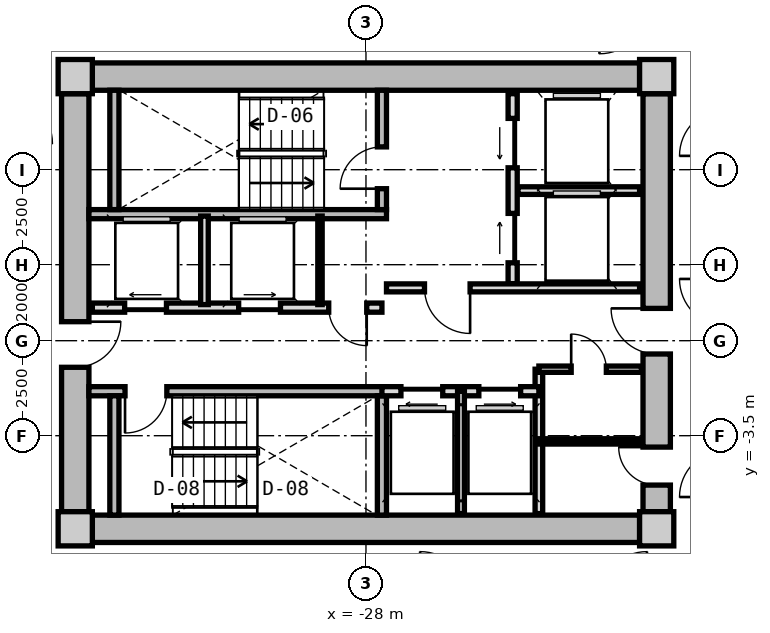
"""IFC4 building model, lengths in metres.
Left out: names, types, materials, properties, quantities, classifications, styles, units other than length and angle.
Written with IfcOpenShell. Run it as: python <this file> out.ifc"""

import sys

from ifc_helpers import new_model, si_unit, direction, frame, frame_2d, origin, origin_2d, place, context, subcontext, project, spatial, rectangle, extrude, source, transform, mapped, element, fill, save


model = new_model("IFC4")
c1 = context("Model", 3, precision=1e-05, world=origin(), true_north=direction((0.0, 1.0)))
c2 = subcontext(c1, "Body", "Model", "MODEL_VIEW")
j1 = project(units=[si_unit("LENGTHUNIT", "METRE"), si_unit("PLANEANGLEUNIT", "RADIAN")], contexts=[c1])
p1 = place(None, origin())
s1 = spatial("IfcSite", under=j1, at=p1, CompositionType="ELEMENT")
p2 = place(p1, origin())
s2 = spatial("IfcBuilding", under=s1, at=p2, CompositionType="ELEMENT")
p3 = place(p2, frame((0.0, 0.0, 77.95)))
s3 = spatial("IfcBuildingStorey", under=s2, at=p3, CompositionType="ELEMENT", Elevation=77.95)
m1 = source(origin(), c2, "Body", "SweptSolid", [
    extrude(rectangle(XDim=0.9, YDim=0.9, at=origin_2d()), origin(), (0.0, 0.0, 1.0), 3.05),
])
for number, where, z_axis, x_axis in (
    (1, (-35.65, -5.95, 0.0), (0.0, 0.0, 1.0), (1.0, 0.0, 0.0)),
    (2, (-20.35, -5.95, 0.0), (0.0, 0.0, 1.0), (1.0, 0.0, 0.0)),
    (3, (-20.35, 5.95, 0.0), (0.0, 0.0, 1.0), (1.0, 0.0, 0.0)),
    (4, (-35.65, 5.95, 0.0), (0.0, 0.0, 1.0), (1.0, 0.0, 0.0)),
):
    element("IfcColumn", number, at=place(p3, frame(where, z_axis=z_axis, x_axis=x_axis)), inside=s3, PredefinedType="COLUMN", context=c2, shape_type="MappedRepresentation", body=[
        mapped(m1, transform((0.0, 0.0, 0.0), x_axis=(1.0, 0.0, 0.0), y_axis=(0.0, 1.0, 0.0), z_axis=(0.0, 0.0, 1.0), scale=1.0)),
    ])
m2 = source(origin(), c2, "Body", "SweptSolid", [
    extrude(rectangle(XDim=14.4, YDim=0.72, at=frame_2d((7.2, 0.0))), origin(), (0.0, 0.0, 1.0), 2.79),
])
for number, where, z_axis, x_axis in (
    (5, (-35.2, 5.95, 0.0), (0.0, 0.0, 1.0), (1.0, 0.0, 0.0)),
    (6, (-20.8, -5.95, 0.0), (0.0, 0.0, 1.0), (-1.0, 0.0, 0.0)),
):
    element("IfcWall", number, at=place(p3, frame(where, z_axis=z_axis, x_axis=x_axis)), inside=s3, PredefinedType="SHEAR", context=c2, shape_type="MappedRepresentation", body=[
        mapped(m2, transform((0.0, 0.0, 0.0), x_axis=(1.0, 0.0, 0.0), y_axis=(0.0, 1.0, 0.0), z_axis=(0.0, 0.0, 1.0), scale=1.0)),
    ])
m3 = source(origin(), c2, "Body", "SweptSolid", [
    extrude(rectangle(XDim=11.0, YDim=0.72, at=frame_2d((5.5, 0.0))), origin(), (0.0, 0.0, 1.0), 2.79),
])
p4 = place(p3, frame((-35.65, -5.5, 0.0), z_axis=(0.0, 0.0, 1.0), x_axis=(0.0, 1.0, 0.0)))
e7 = element("IfcWall", 7, at=p4, inside=s3, PredefinedType="SHEAR", context=c2, shape_type="MappedRepresentation", body=[
    mapped(m3, transform((0.0, 0.0, 0.0), x_axis=(1.0, 0.0, 0.0), y_axis=(0.0, 1.0, 0.0), z_axis=(0.0, 0.0, 1.0), scale=1.0)),
])
p5 = place(p4, frame((3.8, 0.0, 0.0)))
e8 = element("IfcOpeningElement", 8, at=p5, cuts=e7, PredefinedType="OPENING", context=c2, shape_type="SweptSolid", body=[
    extrude(rectangle(XDim=1.2, YDim=2.15, at=frame_2d((0.6, 1.075))), frame((0.0, 0.37, 0.0), z_axis=(0.0, -1.0, 0.0), x_axis=(1.0, 0.0, 0.0)), (0.0, 0.0, 1.0), 0.74),
])
p6 = place(p3, frame((-20.35, 5.5, 0.0), z_axis=(0.0, 0.0, 1.0), x_axis=(0.0, -1.0, 0.0)))
e9 = element("IfcWall", 9, at=p6, inside=s3, PredefinedType="SHEAR", context=c2, shape_type="MappedRepresentation", body=[
    mapped(m3, transform((0.0, 0.0, 0.0), x_axis=(1.0, 0.0, 0.0), y_axis=(0.0, 1.0, 0.0), z_axis=(0.0, 0.0, 1.0), scale=1.0)),
])
p7 = place(p6, frame((5.65, 0.0, 0.0)))
e10 = element("IfcOpeningElement", 10, at=p7, cuts=e9, PredefinedType="OPENING", context=c2, shape_type="SweptSolid", body=[
    extrude(rectangle(XDim=1.2, YDim=2.15, at=frame_2d((0.6, 1.075))), frame((0.0, 0.37, 0.0), z_axis=(0.0, -1.0, 0.0), x_axis=(1.0, 0.0, 0.0)), (0.0, 0.0, 1.0), 0.74),
])
p8 = place(p6, frame((9.3, 0.0, 0.0)))
e11 = element("IfcOpeningElement", 11, at=p8, cuts=e9, PredefinedType="OPENING", context=c2, shape_type="SweptSolid", body=[
    extrude(rectangle(XDim=1.0, YDim=2.1, at=frame_2d((0.5, 1.05))), frame((0.0, 0.37, 0.0), z_axis=(0.0, -1.0, 0.0), x_axis=(1.0, 0.0, 0.0)), (0.0, 0.0, 1.0), 0.74),
])
m4 = source(origin(), c2, "Body", "SweptSolid", [
    extrude(rectangle(XDim=7.83, YDim=0.24, at=frame_2d((3.915, 0.0))), origin(), (0.0, 0.0, 1.0), 2.79),
])
p9 = place(p3, frame((-35.29, 2.33, 0.0), z_axis=(0.0, 0.0, 1.0), x_axis=(1.0, 0.0, 0.0)))
e12 = element("IfcWall", 12, at=p9, inside=s3, PredefinedType="PARTITIONING", context=c2, shape_type="MappedRepresentation", body=[
    mapped(m4, transform((0.0, 0.0, 0.0), x_axis=(1.0, 0.0, 0.0), y_axis=(0.0, 1.0, 0.0), z_axis=(0.0, 0.0, 1.0), scale=1.0)),
])
m5 = source(origin(), c2, "Body", "SweptSolid", [
    extrude(rectangle(XDim=3.14, YDim=0.24, at=frame_2d((1.57, 0.0))), origin(), (0.0, 0.0, 1.0), 2.79),
])
p10 = place(p3, frame((-34.62, 2.45, 0.0), z_axis=(0.0, 0.0, 1.0), x_axis=(0.0, 1.0, 0.0)))
e13 = element("IfcWall", 13, at=p10, inside=s3, PredefinedType="PARTITIONING", context=c2, shape_type="MappedRepresentation", body=[
    mapped(m5, transform((0.0, 0.0, 0.0), x_axis=(1.0, 0.0, 0.0), y_axis=(0.0, 1.0, 0.0), z_axis=(0.0, 0.0, 1.0), scale=1.0)),
])
p11 = place(p3, frame((-27.58, 2.45, 0.0), z_axis=(0.0, 0.0, 1.0), x_axis=(0.0, 1.0, 0.0)))
e14 = element("IfcWall", 14, at=p11, inside=s3, PredefinedType="PARTITIONING", context=c2, shape_type="MappedRepresentation", body=[
    mapped(m5, transform((0.0, 0.0, 0.0), x_axis=(1.0, 0.0, 0.0), y_axis=(0.0, 1.0, 0.0), z_axis=(0.0, 0.0, 1.0), scale=1.0)),
])
p12 = place(p11, frame((0.55, 0.0, 0.0)))
e15 = element("IfcOpeningElement", 15, at=p12, cuts=e14, PredefinedType="OPENING", context=c2, shape_type="SweptSolid", body=[
    extrude(rectangle(XDim=1.1, YDim=2.15, at=frame_2d((0.55, 1.075))), frame((0.0, 0.13, 0.0), z_axis=(0.0, -1.0, 0.0), x_axis=(1.0, 0.0, 0.0)), (0.0, 0.0, 1.0), 0.26),
])
p13 = place(p3, frame((-35.29, -2.33, 0.0), z_axis=(0.0, 0.0, 1.0), x_axis=(1.0, 0.0, 0.0)))
e16 = element("IfcWall", 16, at=p13, inside=s3, PredefinedType="PARTITIONING", context=c2, shape_type="MappedRepresentation", body=[
    mapped(m4, transform((0.0, 0.0, 0.0), x_axis=(1.0, 0.0, 0.0), y_axis=(0.0, 1.0, 0.0), z_axis=(0.0, 0.0, 1.0), scale=1.0)),
])
p14 = place(p13, frame((0.95, 0.0, 0.0)))
e17 = element("IfcOpeningElement", 17, at=p14, cuts=e16, PredefinedType="OPENING", context=c2, shape_type="SweptSolid", body=[
    extrude(rectangle(XDim=1.1, YDim=2.15, at=frame_2d((0.55, 1.075))), frame((0.0, 0.13, 0.0), z_axis=(0.0, -1.0, 0.0), x_axis=(1.0, 0.0, 0.0)), (0.0, 0.0, 1.0), 0.26),
])
for number, where, z_axis, x_axis in (
    (18, (-34.62, -5.59, 0.0), (0.0, 0.0, 1.0), (0.0, 1.0, 0.0)),
    (19, (-27.58, -5.59, 0.0), (0.0, 0.0, 1.0), (0.0, 1.0, 0.0)),
):
    element("IfcWall", number, at=place(p3, frame(where, z_axis=z_axis, x_axis=x_axis)), inside=s3, PredefinedType="PARTITIONING", context=c2, shape_type="MappedRepresentation", body=[
        mapped(m5, transform((0.0, 0.0, 0.0), x_axis=(1.0, 0.0, 0.0), y_axis=(0.0, 1.0, 0.0), z_axis=(0.0, 0.0, 1.0), scale=1.0)),
    ])
m6 = source(origin(), c2, "Body", "SweptSolid", [
    extrude(rectangle(XDim=5.0, YDim=0.24, at=frame_2d((2.5, 0.0))), origin(), (0.0, 0.0, 1.0), 2.775),
])
p15 = place(p3, frame((-24.14, 0.5, 0.0), z_axis=(0.0, 0.0, 1.0), x_axis=(0.0, 1.0, 0.0)))
e20 = element("IfcWall", 20, at=p15, inside=s3, PredefinedType="PARTITIONING", context=c2, shape_type="MappedRepresentation", body=[
    mapped(m6, transform((0.0, 0.0, 0.0), x_axis=(1.0, 0.0, 0.0), y_axis=(0.0, 1.0, 0.0), z_axis=(0.0, 0.0, 1.0), scale=1.0)),
])
p16 = place(p15, frame((3.05, 0.0, 0.0)))
e21 = element("IfcOpeningElement", 21, at=p16, cuts=e20, PredefinedType="OPENING", context=c2, shape_type="SweptSolid", body=[
    extrude(rectangle(XDim=1.3, YDim=2.2, at=frame_2d((0.65, 1.1))), frame((0.0, 0.13, 0.0), z_axis=(0.0, -1.0, 0.0), x_axis=(1.0, 0.0, 0.0)), (0.0, 0.0, 1.0), 0.26),
])
p17 = place(p15, frame((0.55, 0.0, 0.0)))
e22 = element("IfcOpeningElement", 22, at=p17, cuts=e20, PredefinedType="OPENING", context=c2, shape_type="SweptSolid", body=[
    extrude(rectangle(XDim=1.3, YDim=2.2, at=frame_2d((0.65, 1.1))), frame((0.0, 0.13, 0.0), z_axis=(0.0, -1.0, 0.0), x_axis=(1.0, 0.0, 0.0)), (0.0, 0.0, 1.0), 0.26),
])
m7 = source(origin(), c2, "Body", "SweptSolid", [
    extrude(rectangle(XDim=3.2, YDim=0.2, at=frame_2d((1.6, 0.0))), origin(), (0.0, 0.0, 1.0), 2.775),
])
p18 = place(p3, frame((-24.0, 2.95, 0.0), z_axis=(0.0, 0.0, 1.0), x_axis=(1.0, 0.0, 0.0)))
e23 = element("IfcWall", 23, at=p18, inside=s3, PredefinedType="PARTITIONING", context=c2, shape_type="MappedRepresentation", body=[
    mapped(m7, transform((0.0, 0.0, 0.0), x_axis=(1.0, 0.0, 0.0), y_axis=(0.0, 1.0, 0.0), z_axis=(0.0, 0.0, 1.0), scale=1.0)),
])
m8 = source(origin(), c2, "Body", "SweptSolid", [
    extrude(rectangle(XDim=6.66, YDim=0.21, at=frame_2d((3.33, 0.0))), origin(), (0.0, 0.0, 1.0), 2.775),
])
p19 = place(p3, frame((-27.46, 0.39, 0.0), z_axis=(0.0, 0.0, 1.0), x_axis=(1.0, 0.0, 0.0)))
e24 = element("IfcWall", 24, at=p19, inside=s3, PredefinedType="PARTITIONING", context=c2, shape_type="MappedRepresentation", body=[
    mapped(m8, transform((0.0, 0.0, 0.0), x_axis=(1.0, 0.0, 0.0), y_axis=(0.0, 1.0, 0.0), z_axis=(0.0, 0.0, 1.0), scale=1.0)),
])
p20 = place(p19, frame((1.0, 0.0, 0.0)))
e25 = element("IfcOpeningElement", 25, at=p20, cuts=e24, PredefinedType="OPENING", context=c2, shape_type="SweptSolid", body=[
    extrude(rectangle(XDim=1.2, YDim=2.15, at=frame_2d((0.6, 1.075))), frame((0.0, 0.115, 0.0), z_axis=(0.0, -1.0, 0.0), x_axis=(1.0, 0.0, 0.0)), (0.0, 0.0, 1.0), 0.23),
])
m9 = source(origin(), c2, "Body", "SweptSolid", [
    extrude(rectangle(XDim=7.62, YDim=0.24, at=frame_2d((3.81, 0.0))), origin(), (0.0, 0.0, 1.0), 2.775),
])
p21 = place(p3, frame((-35.2, -0.13, 0.0), z_axis=(0.0, 0.0, 1.0), x_axis=(1.0, 0.0, 0.0)))
e26 = element("IfcWall", 26, at=p21, inside=s3, PredefinedType="PARTITIONING", context=c2, shape_type="MappedRepresentation", body=[
    mapped(m9, transform((0.0, 0.0, 0.0), x_axis=(1.0, 0.0, 0.0), y_axis=(0.0, 1.0, 0.0), z_axis=(0.0, 0.0, 1.0), scale=1.0)),
])
p22 = place(p21, frame((6.22, 0.0, 0.0)))
e27 = element("IfcOpeningElement", 27, at=p22, cuts=e26, PredefinedType="OPENING", context=c2, shape_type="SweptSolid", body=[
    extrude(rectangle(XDim=1.0, YDim=2.1, at=frame_2d((0.5, 1.05))), frame((0.0, 0.13, 0.0), z_axis=(0.0, -1.0, 0.0), x_axis=(1.0, 0.0, 0.0)), (0.0, 0.0, 1.0), 0.26),
])
p23 = place(p21, frame((0.85, 0.0, 0.0)))
e28 = element("IfcOpeningElement", 28, at=p23, cuts=e26, PredefinedType="OPENING", context=c2, shape_type="SweptSolid", body=[
    extrude(rectangle(XDim=1.1, YDim=2.2, at=frame_2d((0.55, 1.1))), frame((0.0, 0.13, 0.0), z_axis=(0.0, -1.0, 0.0), x_axis=(1.0, 0.0, 0.0)), (0.0, 0.0, 1.0), 0.26),
])
p24 = place(p21, frame((3.85, 0.0, 0.0)))
e29 = element("IfcOpeningElement", 29, at=p24, cuts=e26, PredefinedType="OPENING", context=c2, shape_type="SweptSolid", body=[
    extrude(rectangle(XDim=1.1, YDim=2.2, at=frame_2d((0.55, 1.1))), frame((0.0, 0.13, 0.0), z_axis=(0.0, -1.0, 0.0), x_axis=(1.0, 0.0, 0.0)), (0.0, 0.0, 1.0), 0.26),
])
m10 = source(origin(), c2, "Body", "SweptSolid", [
    extrude(rectangle(XDim=2.33, YDim=0.115, at=frame_2d((1.165, 0.0))), origin(), (0.0, 0.0, 1.0), 2.775),
])
p25 = place(p3, frame((-29.21, -0.05, 0.0), z_axis=(0.0, 0.0, 1.0), x_axis=(0.0, 1.0, 0.0)))
e30 = element("IfcWall", 30, at=p25, inside=s3, PredefinedType="PARTITIONING", context=c2, shape_type="MappedRepresentation", body=[
    mapped(m10, transform((0.0, 0.0, 0.0), x_axis=(1.0, 0.0, 0.0), y_axis=(0.0, 1.0, 0.0), z_axis=(0.0, 0.0, 1.0), scale=1.0)),
])
m11 = source(origin(), c2, "Body", "SweptSolid", [
    extrude(rectangle(XDim=2.33, YDim=0.2, at=frame_2d((1.165, 0.0))), origin(), (0.0, 0.0, 1.0), 2.775),
])
p26 = place(p3, frame((-32.25, -0.05, 0.0), z_axis=(0.0, 0.0, 1.0), x_axis=(0.0, 1.0, 0.0)))
e31 = element("IfcWall", 31, at=p26, inside=s3, PredefinedType="PARTITIONING", context=c2, shape_type="MappedRepresentation", body=[
    mapped(m11, transform((0.0, 0.0, 0.0), x_axis=(1.0, 0.0, 0.0), y_axis=(0.0, 1.0, 0.0), z_axis=(0.0, 0.0, 1.0), scale=1.0)),
])
m12 = source(origin(), c2, "Body", "SweptSolid", [
    extrude(rectangle(XDim=3.8, YDim=0.2, at=frame_2d((1.9, 0.0))), origin(), (0.0, 0.0, 1.0), 2.775),
])
p27 = place(p3, frame((-23.45, -5.55, 0.0), z_axis=(0.0, 0.0, 1.0), x_axis=(0.0, 1.0, 0.0)))
e32 = element("IfcWall", 32, at=p27, inside=s3, PredefinedType="PARTITIONING", context=c2, shape_type="MappedRepresentation", body=[
    mapped(m12, transform((0.0, 0.0, 0.0), x_axis=(1.0, 0.0, 0.0), y_axis=(0.0, 1.0, 0.0), z_axis=(0.0, 0.0, 1.0), scale=1.0)),
])
m13 = source(origin(), c2, "Body", "SweptSolid", [
    extrude(rectangle(XDim=4.13, YDim=0.24, at=frame_2d((2.065, 0.0))), origin(), (0.0, 0.0, 1.0), 2.775),
])
p28 = place(p3, frame((-27.58, -2.33, 0.0), z_axis=(0.0, 0.0, 1.0), x_axis=(1.0, 0.0, 0.0)))
e33 = element("IfcWall", 33, at=p28, inside=s3, PredefinedType="PARTITIONING", context=c2, shape_type="MappedRepresentation", body=[
    mapped(m13, transform((0.0, 0.0, 0.0), x_axis=(1.0, 0.0, 0.0), y_axis=(0.0, 1.0, 0.0), z_axis=(0.0, 0.0, 1.0), scale=1.0)),
])
p29 = place(p28, frame((0.5, 0.0, 0.0)))
e34 = element("IfcOpeningElement", 34, at=p29, cuts=e33, PredefinedType="OPENING", context=c2, shape_type="SweptSolid", body=[
    extrude(rectangle(XDim=1.1, YDim=2.2, at=frame_2d((0.55, 1.1))), frame((0.0, 0.13, 0.0), z_axis=(0.0, -1.0, 0.0), x_axis=(1.0, 0.0, 0.0)), (0.0, 0.0, 1.0), 0.26),
])
p30 = place(p28, frame((2.55, 0.0, 0.0)))
e35 = element("IfcOpeningElement", 35, at=p30, cuts=e33, PredefinedType="OPENING", context=c2, shape_type="SweptSolid", body=[
    extrude(rectangle(XDim=1.1, YDim=2.2, at=frame_2d((0.55, 1.1))), frame((0.0, 0.13, 0.0), z_axis=(0.0, -1.0, 0.0), x_axis=(1.0, 0.0, 0.0)), (0.0, 0.0, 1.0), 0.26),
])
m14 = source(origin(), c2, "Body", "SweptSolid", [
    extrude(rectangle(XDim=3.22, YDim=0.18, at=frame_2d((1.61, 0.0))), origin(), (0.0, 0.0, 1.0), 2.775),
])
p31 = place(p3, frame((-25.5, -5.55, 0.0), z_axis=(0.0, 0.0, 1.0), x_axis=(0.0, 1.0, 0.0)))
e36 = element("IfcWall", 36, at=p31, inside=s3, PredefinedType="PARTITIONING", context=c2, shape_type="MappedRepresentation", body=[
    mapped(m14, transform((0.0, 0.0, 0.0), x_axis=(1.0, 0.0, 0.0), y_axis=(0.0, 1.0, 0.0), z_axis=(0.0, 0.0, 1.0), scale=1.0)),
])
m15 = source(origin(), c2, "Body", "SweptSolid", [
    extrude(rectangle(XDim=2.7, YDim=0.165, at=frame_2d((1.35, 0.0))), origin(), (0.0, 0.0, 1.0), 2.775),
])
p32 = place(p3, frame((-23.45, -1.75, 0.0), z_axis=(0.0, 0.0, 1.0), x_axis=(1.0, 0.0, 0.0)))
e37 = element("IfcWall", 37, at=p32, inside=s3, PredefinedType="PARTITIONING", context=c2, shape_type="MappedRepresentation", body=[
    mapped(m15, transform((0.0, 0.0, 0.0), x_axis=(1.0, 0.0, 0.0), y_axis=(0.0, 1.0, 0.0), z_axis=(0.0, 0.0, 1.0), scale=1.0)),
])
p33 = place(p32, frame((0.85, 0.0, 0.0)))
e38 = element("IfcOpeningElement", 38, at=p33, cuts=e37, PredefinedType="OPENING", context=c2, shape_type="SweptSolid", body=[
    extrude(rectangle(XDim=0.925, YDim=2.1, at=frame_2d((0.462, 1.05))), frame((0.0, 0.093, 0.0), z_axis=(0.0, -1.0, 0.0), x_axis=(1.0, 0.0, 0.0)), (0.0, 0.0, 1.0), 0.185),
])
m16 = source(origin(), c2, "Body", "SweptSolid", [
    extrude(rectangle(XDim=2.7, YDim=0.14, at=frame_2d((1.35, 0.0))), origin(), (0.0, 0.0, 1.0), 2.775),
])
p34 = place(p3, frame((-23.45, -3.65, 0.0), z_axis=(0.0, 0.0, 1.0), x_axis=(1.0, 0.0, 0.0)))
e39 = element("IfcWall", 39, at=p34, inside=s3, PredefinedType="PARTITIONING", context=c2, shape_type="MappedRepresentation", body=[
    mapped(m16, transform((0.0, 0.0, 0.0), x_axis=(1.0, 0.0, 0.0), y_axis=(0.0, 1.0, 0.0), z_axis=(0.0, 0.0, 1.0), scale=1.0)),
])
m17 = source(origin(), c2, "Body", "SweptSolid", [
    extrude(rectangle(XDim=1.1, YDim=2.15, at=frame_2d((0.55, 1.075))), frame((0.0, 0.025, 0.0), z_axis=(0.0, -1.0, 0.0), x_axis=(1.0, 0.0, 0.0)), (0.0, 0.0, 1.0), 0.05),
])
p35 = place(p12, origin())
e40 = element("IfcDoor", 40, at=p35, inside=s3, OperationType="SINGLE_SWING_LEFT", PredefinedType="DOOR", context=c2, shape_type="MappedRepresentation", body=[
    mapped(m17, transform((0.0, 0.0, 0.0), x_axis=(1.0, 0.0, 0.0), y_axis=(0.0, 1.0, 0.0), z_axis=(0.0, 0.0, 1.0), scale=1.0)),
])
fill(e15, e40)
p36 = place(p14, frame((1.1, 0.0, 0.0), z_axis=(0.0, 0.0, 1.0), x_axis=(-1.0, 0.0, 0.0)))
e41 = element("IfcDoor", 41, at=p36, inside=s3, OperationType="SINGLE_SWING_RIGHT", PredefinedType="DOOR", context=c2, shape_type="MappedRepresentation", body=[
    mapped(m17, transform((0.0, 0.0, 0.0), x_axis=(1.0, 0.0, 0.0), y_axis=(0.0, 1.0, 0.0), z_axis=(0.0, 0.0, 1.0), scale=1.0)),
])
fill(e17, e41)
m18 = source(origin(), c2, "Body", "SweptSolid", [
    extrude(rectangle(XDim=1.3, YDim=2.2, at=frame_2d((0.65, 1.1))), frame((0.0, 0.025, 0.0), z_axis=(0.0, -1.0, 0.0), x_axis=(1.0, 0.0, 0.0)), (0.0, 0.0, 1.0), 0.05),
])
p37 = place(p16, origin())
e42 = element("IfcDoor", 42, at=p37, inside=s3, OperationType="SLIDING_TO_LEFT", PredefinedType="DOOR", context=c2, shape_type="MappedRepresentation", body=[
    mapped(m18, transform((0.0, 0.0, 0.0), x_axis=(1.0, 0.0, 0.0), y_axis=(0.0, 1.0, 0.0), z_axis=(0.0, 0.0, 1.0), scale=1.0)),
])
fill(e21, e42)
p38 = place(p17, origin())
e43 = element("IfcDoor", 43, at=p38, inside=s3, OperationType="SLIDING_TO_RIGHT", PredefinedType="DOOR", context=c2, shape_type="MappedRepresentation", body=[
    mapped(m18, transform((0.0, 0.0, 0.0), x_axis=(1.0, 0.0, 0.0), y_axis=(0.0, 1.0, 0.0), z_axis=(0.0, 0.0, 1.0), scale=1.0)),
])
fill(e22, e43)
m19 = source(origin(), c2, "Body", "SweptSolid", [
    extrude(rectangle(XDim=1.2, YDim=2.15, at=frame_2d((0.6, 1.075))), frame((0.0, 0.025, 0.0), z_axis=(0.0, -1.0, 0.0), x_axis=(1.0, 0.0, 0.0)), (0.0, 0.0, 1.0), 0.05),
])
p39 = place(p20, frame((1.2, 0.0, 0.0), z_axis=(0.0, 0.0, 1.0), x_axis=(-1.0, 0.0, 0.0)))
e44 = element("IfcDoor", 44, at=p39, inside=s3, OperationType="SINGLE_SWING_LEFT", PredefinedType="DOOR", context=c2, shape_type="MappedRepresentation", body=[
    mapped(m19, transform((0.0, 0.0, 0.0), x_axis=(1.0, 0.0, 0.0), y_axis=(0.0, 1.0, 0.0), z_axis=(0.0, 0.0, 1.0), scale=1.0)),
])
fill(e25, e44)
p40 = place(p5, frame((1.2, 0.0, 0.0), z_axis=(0.0, 0.0, 1.0), x_axis=(-1.0, 0.0, 0.0)))
e45 = element("IfcDoor", 45, at=p40, inside=s3, OperationType="SINGLE_SWING_LEFT", PredefinedType="DOOR", context=c2, shape_type="MappedRepresentation", body=[
    mapped(m19, transform((0.0, 0.0, 0.0), x_axis=(1.0, 0.0, 0.0), y_axis=(0.0, 1.0, 0.0), z_axis=(0.0, 0.0, 1.0), scale=1.0)),
])
fill(e8, e45)
p41 = place(p7, frame((1.2, 0.0, 0.0), z_axis=(0.0, 0.0, 1.0), x_axis=(-1.0, 0.0, 0.0)))
e46 = element("IfcDoor", 46, at=p41, inside=s3, OperationType="SINGLE_SWING_RIGHT", PredefinedType="DOOR", context=c2, shape_type="MappedRepresentation", body=[
    mapped(m19, transform((0.0, 0.0, 0.0), x_axis=(1.0, 0.0, 0.0), y_axis=(0.0, 1.0, 0.0), z_axis=(0.0, 0.0, 1.0), scale=1.0)),
])
fill(e10, e46)
m20 = source(origin(), c2, "Body", "SweptSolid", [
    extrude(rectangle(XDim=1.0, YDim=2.1, at=frame_2d((0.5, 1.05))), frame((0.0, 0.025, 0.0), z_axis=(0.0, -1.0, 0.0), x_axis=(1.0, 0.0, 0.0)), (0.0, 0.0, 1.0), 0.05),
])
p42 = place(p22, frame((1.0, 0.0, 0.0), z_axis=(0.0, 0.0, 1.0), x_axis=(-1.0, 0.0, 0.0)))
e47 = element("IfcDoor", 47, at=p42, inside=s3, OperationType="SINGLE_SWING_LEFT", PredefinedType="DOOR", context=c2, shape_type="MappedRepresentation", body=[
    mapped(m20, transform((0.0, 0.0, 0.0), x_axis=(1.0, 0.0, 0.0), y_axis=(0.0, 1.0, 0.0), z_axis=(0.0, 0.0, 1.0), scale=1.0)),
])
fill(e27, e47)
m21 = source(origin(), c2, "Body", "SweptSolid", [
    extrude(rectangle(XDim=1.1, YDim=2.2, at=frame_2d((0.55, 1.1))), frame((0.0, 0.025, 0.0), z_axis=(0.0, -1.0, 0.0), x_axis=(1.0, 0.0, 0.0)), (0.0, 0.0, 1.0), 0.05),
])
p43 = place(p23, origin())
e48 = element("IfcDoor", 48, at=p43, inside=s3, OperationType="SLIDING_TO_LEFT", PredefinedType="DOOR", context=c2, shape_type="MappedRepresentation", body=[
    mapped(m21, transform((0.0, 0.0, 0.0), x_axis=(1.0, 0.0, 0.0), y_axis=(0.0, 1.0, 0.0), z_axis=(0.0, 0.0, 1.0), scale=1.0)),
])
fill(e28, e48)
p44 = place(p24, origin())
e49 = element("IfcDoor", 49, at=p44, inside=s3, OperationType="SLIDING_TO_RIGHT", PredefinedType="DOOR", context=c2, shape_type="MappedRepresentation", body=[
    mapped(m21, transform((0.0, 0.0, 0.0), x_axis=(1.0, 0.0, 0.0), y_axis=(0.0, 1.0, 0.0), z_axis=(0.0, 0.0, 1.0), scale=1.0)),
])
fill(e29, e49)
p45 = place(p29, frame((1.1, 0.0, 0.0), z_axis=(0.0, 0.0, 1.0), x_axis=(-1.0, 0.0, 0.0)))
e50 = element("IfcDoor", 50, at=p45, inside=s3, OperationType="SLIDING_TO_LEFT", PredefinedType="DOOR", context=c2, shape_type="MappedRepresentation", body=[
    mapped(m21, transform((0.0, 0.0, 0.0), x_axis=(1.0, 0.0, 0.0), y_axis=(0.0, 1.0, 0.0), z_axis=(0.0, 0.0, 1.0), scale=1.0)),
])
fill(e34, e50)
p46 = place(p30, frame((1.1, 0.0, 0.0), z_axis=(0.0, 0.0, 1.0), x_axis=(-1.0, 0.0, 0.0)))
e51 = element("IfcDoor", 51, at=p46, inside=s3, OperationType="SLIDING_TO_RIGHT", PredefinedType="DOOR", context=c2, shape_type="MappedRepresentation", body=[
    mapped(m21, transform((0.0, 0.0, 0.0), x_axis=(1.0, 0.0, 0.0), y_axis=(0.0, 1.0, 0.0), z_axis=(0.0, 0.0, 1.0), scale=1.0)),
])
fill(e35, e51)
m22 = source(origin(), c2, "Body", "SweptSolid", [
    extrude(rectangle(XDim=0.925, YDim=2.1, at=frame_2d((0.462, 1.05))), frame((0.0, 0.025, 0.0), z_axis=(0.0, -1.0, 0.0), x_axis=(1.0, 0.0, 0.0)), (0.0, 0.0, 1.0), 0.05),
])
p47 = place(p33, origin())
e52 = element("IfcDoor", 52, at=p47, inside=s3, OperationType="SINGLE_SWING_LEFT", PredefinedType="DOOR", context=c2, shape_type="MappedRepresentation", body=[
    mapped(m22, transform((0.0, 0.0, 0.0), x_axis=(1.0, 0.0, 0.0), y_axis=(0.0, 1.0, 0.0), z_axis=(0.0, 0.0, 1.0), scale=1.0)),
])
fill(e38, e52)
p48 = place(p8, frame((1.0, 0.0, 0.0), z_axis=(0.0, 0.0, 1.0), x_axis=(-1.0, 0.0, 0.0)))
e53 = element("IfcDoor", 53, at=p48, inside=s3, OperationType="SINGLE_SWING_RIGHT", PredefinedType="DOOR", context=c2, shape_type="MappedRepresentation", body=[
    mapped(m20, transform((0.0, 0.0, 0.0), x_axis=(1.0, 0.0, 0.0), y_axis=(0.0, 1.0, 0.0), z_axis=(0.0, 0.0, 1.0), scale=1.0)),
])
fill(e11, e53)
save(model, sys.argv[1])
